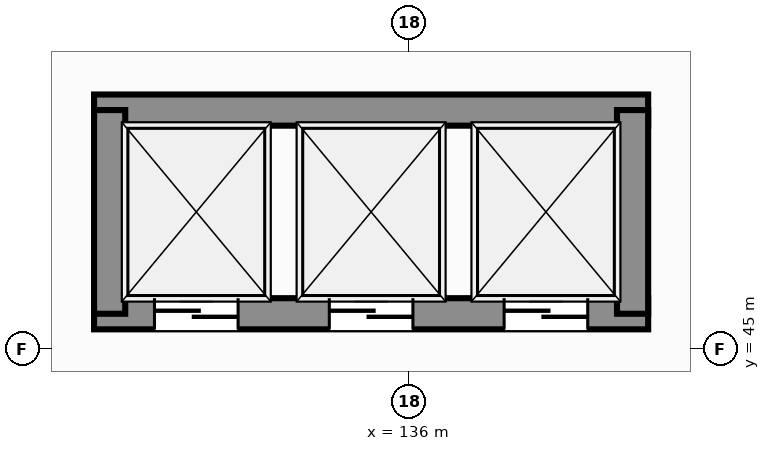
"""IFC4 building model, lengths in metres.
Left out: names, types, materials, properties, quantities, classifications, styles, units other than length and angle.
Written with IfcOpenShell. Run it as: python <this file> out.ifc"""

import sys

from ifc_helpers import new_model, si_unit, direction, frame, frame_2d, origin, place, context, subcontext, project, spatial, rectangle, extrude, element, fill, save


model = new_model("IFC4")
c1 = context("Model", 3, precision=1e-05, world=origin(), true_north=direction((0.0, 1.0)))
c2 = subcontext(c1, "Body", "Model", "MODEL_VIEW")
j1 = project(units=[si_unit("LENGTHUNIT", "METRE"), si_unit("PLANEANGLEUNIT", "RADIAN")], contexts=[c1])
p1 = place(None, origin())
s1 = spatial("IfcSite", under=j1, at=p1, CompositionType="ELEMENT")
p2 = place(p1, origin())
s2 = spatial("IfcBuilding", under=s1, at=p2, CompositionType="ELEMENT")
p3 = place(p2, frame((0.0, 0.0, -4.8)))
s3 = spatial("IfcBuildingStorey", under=s2, at=p3, CompositionType="ELEMENT", Elevation=-4.8)
p4 = place(p3, frame((131.855, 45.46, 0.0), z_axis=(0.0, 0.0, 1.0), x_axis=(1.0, 0.0, 0.0)))
e1 = element("IfcWall", 1, at=p4, inside=s3, PredefinedType="SHEAR", context=c2, shape_type="SweptSolid", body=[
    extrude(rectangle(XDim=7.29, YDim=0.41, at=frame_2d((3.645, 0.0))), origin(), (0.0, 0.0, 1.0), 4.8),
])
p5 = place(p4, frame((0.795, 0.0, 0.0)))
e2 = element("IfcOpeningElement", 2, at=p5, cuts=e1, PredefinedType="OPENING", context=c2, shape_type="SweptSolid", body=[
    extrude(rectangle(XDim=1.1, YDim=2.2, at=frame_2d((0.55, 1.1))), frame((0.0, 0.215, 0.0), z_axis=(0.0, -1.0, 0.0), x_axis=(1.0, 0.0, 0.0)), (0.0, 0.0, 1.0), 0.43),
])
p6 = place(p4, frame((3.095, 0.0, 0.0)))
e3 = element("IfcOpeningElement", 3, at=p6, cuts=e1, PredefinedType="OPENING", context=c2, shape_type="SweptSolid", body=[
    extrude(rectangle(XDim=1.1, YDim=2.2, at=frame_2d((0.55, 1.1))), frame((0.0, 0.215, 0.0), z_axis=(0.0, -1.0, 0.0), x_axis=(1.0, 0.0, 0.0)), (0.0, 0.0, 1.0), 0.43),
])
p7 = place(p4, frame((5.395, 0.0, 0.0)))
e4 = element("IfcOpeningElement", 4, at=p7, cuts=e1, PredefinedType="OPENING", context=c2, shape_type="SweptSolid", body=[
    extrude(rectangle(XDim=1.1, YDim=2.2, at=frame_2d((0.55, 1.1))), frame((0.0, 0.215, 0.0), z_axis=(0.0, -1.0, 0.0), x_axis=(1.0, 0.0, 0.0)), (0.0, 0.0, 1.0), 0.43),
])
p8 = place(p3, frame((131.855, 48.14, 0.0), z_axis=(0.0, 0.0, 1.0), x_axis=(1.0, 0.0, 0.0)))
e5 = element("IfcWall", 5, at=p8, inside=s3, PredefinedType="SHEAR", context=c2, shape_type="SweptSolid", body=[
    extrude(rectangle(XDim=7.29, YDim=0.41, at=frame_2d((3.645, 0.0))), origin(), (0.0, 0.0, 1.0), 4.8),
])
for number, where, z_axis, x_axis in (
    (6, (132.06, 45.46, 0.0), (0.0, 0.0, 1.0), (0.0, 1.0, 0.0)),
    (7, (138.94, 45.46, 0.0), (0.0, 0.0, 1.0), (0.0, 1.0, 0.0)),
):
    element("IfcWall", number, at=place(p3, frame(where, z_axis=z_axis, x_axis=x_axis)), inside=s3, PredefinedType="SHEAR", context=c2, shape_type="SweptSolid", body=[
        extrude(rectangle(XDim=2.68, YDim=0.41, at=frame_2d((1.34, 0.0))), origin(), (0.0, 0.0, 1.0), 4.8),
    ])
p9 = place(p5, origin())
e8 = element("IfcDoor", 8, at=p9, inside=s3, OperationType="DOUBLE_DOOR_SLIDING", PredefinedType="DOOR", context=c2, shape_type="SweptSolid", body=[
    extrude(rectangle(XDim=1.1, YDim=2.2, at=frame_2d((0.55, 1.1))), frame((0.0, 0.025, 0.0), z_axis=(0.0, -1.0, 0.0), x_axis=(1.0, 0.0, 0.0)), (0.0, 0.0, 1.0), 0.05),
])
fill(e2, e8)
p10 = place(p6, origin())
e9 = element("IfcDoor", 9, at=p10, inside=s3, OperationType="DOUBLE_DOOR_SLIDING", PredefinedType="DOOR", context=c2, shape_type="SweptSolid", body=[
    extrude(rectangle(XDim=1.1, YDim=2.2, at=frame_2d((0.55, 1.1))), frame((0.0, 0.025, 0.0), z_axis=(0.0, -1.0, 0.0), x_axis=(1.0, 0.0, 0.0)), (0.0, 0.0, 1.0), 0.05),
])
fill(e3, e9)
p11 = place(p7, origin())
e10 = element("IfcDoor", 10, at=p11, inside=s3, OperationType="DOUBLE_DOOR_SLIDING", PredefinedType="DOOR", context=c2, shape_type="SweptSolid", body=[
    extrude(rectangle(XDim=1.1, YDim=2.2, at=frame_2d((0.55, 1.1))), frame((0.0, 0.025, 0.0), z_axis=(0.0, -1.0, 0.0), x_axis=(1.0, 0.0, 0.0)), (0.0, 0.0, 1.0), 0.05),
])
fill(e4, e10)
save(model, sys.argv[1])
